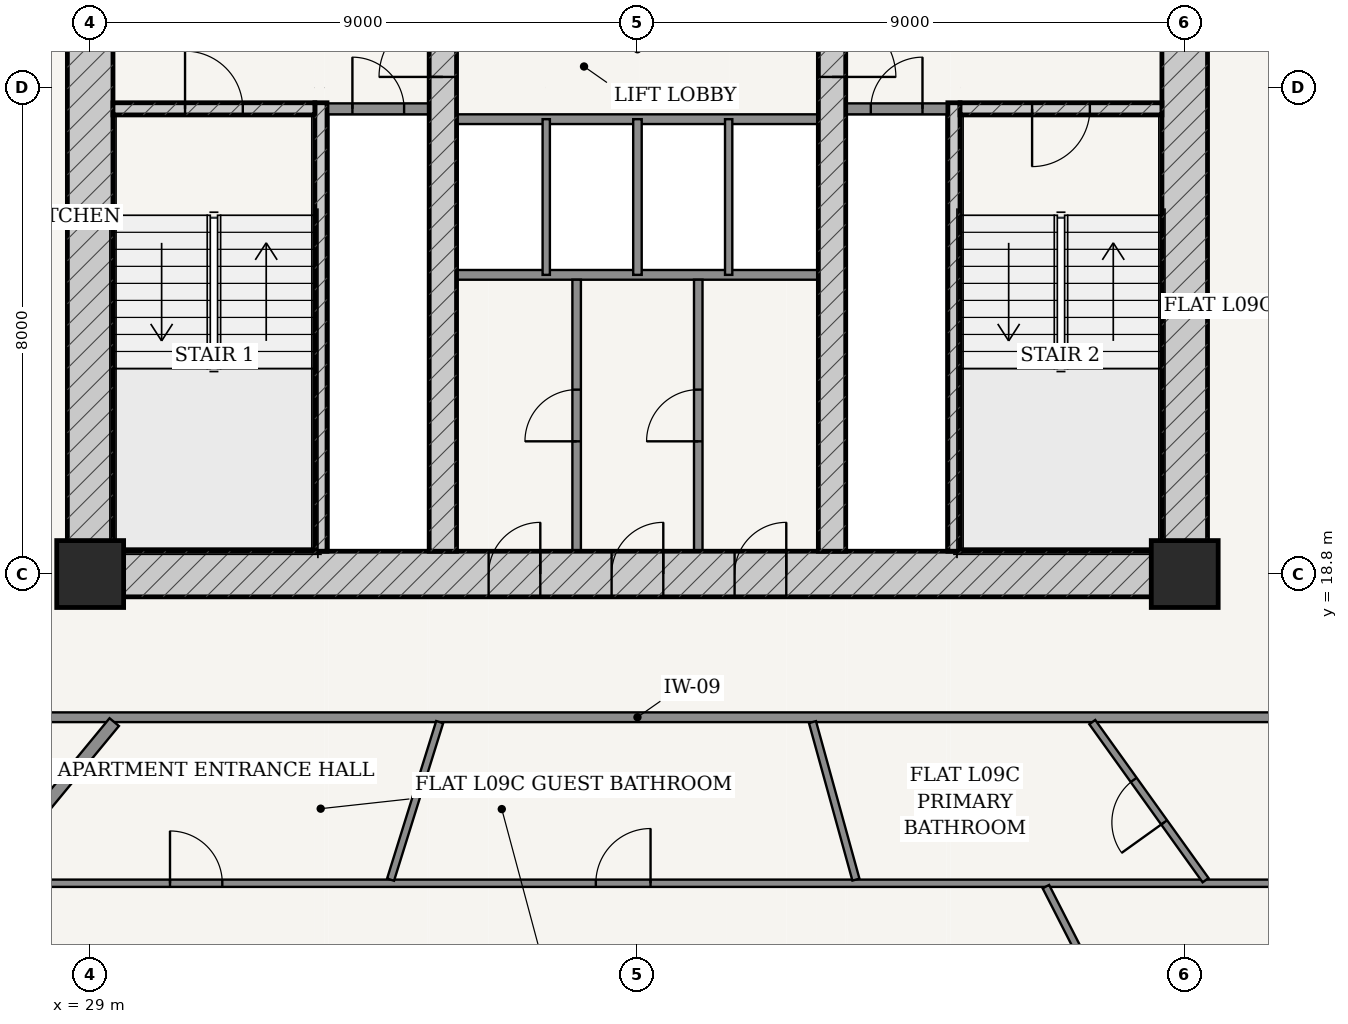
"""IFC4 building model, lengths in metres.
Left out: names, types, materials, properties, quantities, classifications, styles, units other than length and angle.
Written with IfcOpenShell. Run it as: python <this file> out.ifc"""

import sys

from ifc_helpers import new_model, si_unit, direction, frame, frame_2d, origin, origin_2d, place, context, subcontext, project, spatial, rectangle, extrude, source, transform, mapped, element, fill, save


model = new_model("IFC4")
c1 = context("Model", 3, precision=1e-05, world=origin(), true_north=direction((-0.2419218956, 0.970295726276)))
c2 = subcontext(c1, "Body", "Model", "MODEL_VIEW")
j1 = project(units=[si_unit("LENGTHUNIT", "METRE"), si_unit("PLANEANGLEUNIT", "RADIAN")], contexts=[c1])
p1 = place(None, origin())
s1 = spatial("IfcSite", under=j1, at=p1, CompositionType="ELEMENT")
p2 = place(p1, origin())
s2 = spatial("IfcBuilding", under=s1, at=p2, CompositionType="ELEMENT")
p3 = place(p2, frame((0.0, 0.0, 38.4)))
s3 = spatial("IfcBuildingStorey", under=s2, at=p3, CompositionType="ELEMENT", Elevation=38.4)
for number, where, z_axis, x_axis in (
    (1, (29.0, 18.8, 0.0), (0.0, 0.0, 1.0), (1.0, 0.0, 0.0)),
    (2, (47.0, 18.8, 0.0), (0.0, 0.0, 1.0), (1.0, 0.0, 0.0)),
):
    element("IfcColumn", number, at=place(p3, frame(where, z_axis=z_axis, x_axis=x_axis)), inside=s3, PredefinedType="COLUMN", context=c2, shape_type="SweptSolid", body=[
        extrude(rectangle(XDim=1.1, YDim=1.1, at=origin_2d()), origin(), (0.0, 0.0, 1.0), 3.6),
    ])
p4 = place(p3, frame((28.625, 18.8, 0.0), z_axis=(0.0, 0.0, 1.0), x_axis=(1.0, 0.0, 0.0)))
e3 = element("IfcWall", 3, at=p4, inside=s3, PredefinedType="SHEAR", context=c2, shape_type="SweptSolid", body=[
    extrude(rectangle(XDim=18.75, YDim=0.75, at=frame_2d((9.375, 0.0))), origin(), (0.0, 0.0, 1.0), 3.32),
])
p5 = place(p4, frame((6.927, 0.0, 0.0)))
e4 = element("IfcOpeningElement", 4, at=p5, cuts=e3, PredefinedType="OPENING", context=c2, shape_type="SweptSolid", body=[
    extrude(rectangle(XDim=0.85, YDim=2.1, at=frame_2d((0.425, 1.05))), frame((0.0, 0.385, 0.0), z_axis=(0.0, -1.0, 0.0), x_axis=(1.0, 0.0, 0.0)), (0.0, 0.0, 1.0), 0.77),
])
p6 = place(p4, frame((8.95, 0.0, 0.0)))
e5 = element("IfcOpeningElement", 5, at=p6, cuts=e3, PredefinedType="OPENING", context=c2, shape_type="SweptSolid", body=[
    extrude(rectangle(XDim=0.85, YDim=2.1, at=frame_2d((0.425, 1.05))), frame((0.0, 0.385, 0.0), z_axis=(0.0, -1.0, 0.0), x_axis=(1.0, 0.0, 0.0)), (0.0, 0.0, 1.0), 0.77),
])
p7 = place(p4, frame((10.972, 0.0, 0.0)))
e6 = element("IfcOpeningElement", 6, at=p7, cuts=e3, PredefinedType="OPENING", context=c2, shape_type="SweptSolid", body=[
    extrude(rectangle(XDim=0.85, YDim=2.1, at=frame_2d((0.425, 1.05))), frame((0.0, 0.385, 0.0), z_axis=(0.0, -1.0, 0.0), x_axis=(1.0, 0.0, 0.0)), (0.0, 0.0, 1.0), 0.77),
])
p8 = place(p3, frame((29.0, 19.175, 0.0), z_axis=(0.0, 0.0, 1.0), x_axis=(0.0, 1.0, 0.0)))
e7 = element("IfcWall", 7, at=p8, inside=s3, PredefinedType="SHEAR", context=c2, shape_type="SweptSolid", body=[
    extrude(rectangle(XDim=15.25, YDim=0.75, at=frame_2d((7.625, 0.0))), origin(), (0.0, 0.0, 1.0), 3.32),
])
p9 = place(p8, frame((9.875, 0.0, 0.0)))
e8 = element("IfcOpeningElement", 8, at=p9, cuts=e7, PredefinedType="OPENING", context=c2, shape_type="SweptSolid", body=[
    extrude(rectangle(XDim=1.5, YDim=2.2, at=frame_2d((0.75, 1.1))), frame((0.0, 0.385, 0.0), z_axis=(0.0, -1.0, 0.0), x_axis=(1.0, 0.0, 0.0)), (0.0, 0.0, 1.0), 0.77),
])
p10 = place(p3, frame((47.0, 19.175, 0.0), z_axis=(0.0, 0.0, 1.0), x_axis=(0.0, 1.0, 0.0)))
e9 = element("IfcWall", 9, at=p10, inside=s3, PredefinedType="SHEAR", context=c2, shape_type="SweptSolid", body=[
    extrude(rectangle(XDim=15.25, YDim=0.75, at=frame_2d((7.625, 0.0))), origin(), (0.0, 0.0, 1.0), 3.32),
])
p11 = place(p10, frame((9.875, 0.0, 0.0)))
e10 = element("IfcOpeningElement", 10, at=p11, cuts=e9, PredefinedType="OPENING", context=c2, shape_type="SweptSolid", body=[
    extrude(rectangle(XDim=1.5, YDim=2.2, at=frame_2d((0.75, 1.1))), frame((0.0, 0.385, 0.0), z_axis=(0.0, -1.0, 0.0), x_axis=(1.0, 0.0, 0.0)), (0.0, 0.0, 1.0), 0.77),
])
p12 = place(p3, frame((32.795, 19.175, 0.0), z_axis=(0.0, 0.0, 1.0), x_axis=(0.0, 1.0, 0.0)))
e11 = element("IfcWall", 11, at=p12, inside=s3, PredefinedType="SOLIDWALL", context=c2, shape_type="SweptSolid", body=[
    extrude(rectangle(XDim=7.375, YDim=0.2, at=frame_2d((3.688, 0.0))), origin(), (0.0, 0.0, 1.0), 3.32),
])
p13 = place(p3, frame((29.375, 26.45, 0.0), z_axis=(0.0, 0.0, 1.0), x_axis=(1.0, 0.0, 0.0)))
e12 = element("IfcWall", 12, at=p13, inside=s3, PredefinedType="SOLIDWALL", context=c2, shape_type="SweptSolid", body=[
    extrude(rectangle(XDim=3.32, YDim=0.2, at=frame_2d((1.66, 0.0))), origin(), (0.0, 0.0, 1.0), 3.32),
])
p14 = place(p13, frame((1.185, 0.0, 0.0)))
e13 = element("IfcOpeningElement", 13, at=p14, cuts=e12, PredefinedType="OPENING", context=c2, shape_type="SweptSolid", body=[
    extrude(rectangle(XDim=0.95, YDim=2.15, at=frame_2d((0.475, 1.075))), frame((0.0, 0.11, 0.0), z_axis=(0.0, -1.0, 0.0), x_axis=(1.0, 0.0, 0.0)), (0.0, 0.0, 1.0), 0.22),
])
p15 = place(p3, frame((43.205, 19.175, 0.0), z_axis=(0.0, 0.0, 1.0), x_axis=(0.0, 1.0, 0.0)))
e14 = element("IfcWall", 14, at=p15, inside=s3, PredefinedType="SOLIDWALL", context=c2, shape_type="SweptSolid", body=[
    extrude(rectangle(XDim=7.375, YDim=0.2, at=frame_2d((3.688, 0.0))), origin(), (0.0, 0.0, 1.0), 3.32),
])
p16 = place(p3, frame((43.305, 26.45, 0.0), z_axis=(0.0, 0.0, 1.0), x_axis=(1.0, 0.0, 0.0)))
e15 = element("IfcWall", 15, at=p16, inside=s3, PredefinedType="SOLIDWALL", context=c2, shape_type="SweptSolid", body=[
    extrude(rectangle(XDim=3.32, YDim=0.2, at=frame_2d((1.66, 0.0))), origin(), (0.0, 0.0, 1.0), 3.32),
])
p17 = place(p16, frame((1.185, 0.0, 0.0)))
e16 = element("IfcOpeningElement", 16, at=p17, cuts=e15, PredefinedType="OPENING", context=c2, shape_type="SweptSolid", body=[
    extrude(rectangle(XDim=0.95, YDim=2.15, at=frame_2d((0.475, 1.075))), frame((0.0, 0.11, 0.0), z_axis=(0.0, -1.0, 0.0), x_axis=(1.0, 0.0, 0.0)), (0.0, 0.0, 1.0), 0.22),
])
p18 = place(p3, frame((34.8, 19.175, 0.0), z_axis=(0.0, 0.0, 1.0), x_axis=(0.0, 1.0, 0.0)))
e17 = element("IfcWall", 17, at=p18, inside=s3, PredefinedType="SHEAR", context=c2, shape_type="SweptSolid", body=[
    extrude(rectangle(XDim=15.25, YDim=0.45, at=frame_2d((7.625, 0.0))), origin(), (0.0, 0.0, 1.0), 3.32),
])
p19 = place(p18, frame((7.8, 0.0, 0.0)))
e18 = element("IfcOpeningElement", 18, at=p19, cuts=e17, PredefinedType="OPENING", context=c2, shape_type="SweptSolid", body=[
    extrude(rectangle(XDim=1.05, YDim=2.15, at=frame_2d((0.525, 1.075))), frame((0.0, 0.235, 0.0), z_axis=(0.0, -1.0, 0.0), x_axis=(1.0, 0.0, 0.0)), (0.0, 0.0, 1.0), 0.47),
])
p20 = place(p3, frame((41.2, 19.175, 0.0), z_axis=(0.0, 0.0, 1.0), x_axis=(0.0, 1.0, 0.0)))
e19 = element("IfcWall", 19, at=p20, inside=s3, PredefinedType="SHEAR", context=c2, shape_type="SweptSolid", body=[
    extrude(rectangle(XDim=15.25, YDim=0.45, at=frame_2d((7.625, 0.0))), origin(), (0.0, 0.0, 1.0), 3.32),
])
p21 = place(p20, frame((7.8, 0.0, 0.0)))
e20 = element("IfcOpeningElement", 20, at=p21, cuts=e19, PredefinedType="OPENING", context=c2, shape_type="SweptSolid", body=[
    extrude(rectangle(XDim=1.05, YDim=2.15, at=frame_2d((0.525, 1.075))), frame((0.0, 0.235, 0.0), z_axis=(0.0, -1.0, 0.0), x_axis=(1.0, 0.0, 0.0)), (0.0, 0.0, 1.0), 0.47),
])
p22 = place(p3, frame((32.9, 26.45, 0.0), z_axis=(0.0, 0.0, 1.0), x_axis=(1.0, 0.0, 0.0)))
e21 = element("IfcWall", 21, at=p22, inside=s3, PredefinedType="PARTITIONING", context=c2, shape_type="SweptSolid", body=[
    extrude(rectangle(XDim=1.675, YDim=0.18, at=frame_2d((0.837, 0.0))), origin(), (0.0, 0.0, 1.0), 3.32),
])
p23 = place(p22, frame((0.413, 0.0, 0.0)))
e22 = element("IfcOpeningElement", 22, at=p23, cuts=e21, PredefinedType="OPENING", context=c2, shape_type="SweptSolid", body=[
    extrude(rectangle(XDim=0.85, YDim=2.1, at=frame_2d((0.425, 1.05))), frame((0.0, 0.1, 0.0), z_axis=(0.0, -1.0, 0.0), x_axis=(1.0, 0.0, 0.0)), (0.0, 0.0, 1.0), 0.2),
])
p24 = place(p3, frame((41.425, 26.45, 0.0), z_axis=(0.0, 0.0, 1.0), x_axis=(1.0, 0.0, 0.0)))
e23 = element("IfcWall", 23, at=p24, inside=s3, PredefinedType="PARTITIONING", context=c2, shape_type="SweptSolid", body=[
    extrude(rectangle(XDim=1.675, YDim=0.18, at=frame_2d((0.837, 0.0))), origin(), (0.0, 0.0, 1.0), 3.32),
])
p25 = place(p24, frame((0.413, 0.0, 0.0)))
e24 = element("IfcOpeningElement", 24, at=p25, cuts=e23, PredefinedType="OPENING", context=c2, shape_type="SweptSolid", body=[
    extrude(rectangle(XDim=0.85, YDim=2.1, at=frame_2d((0.425, 1.05))), frame((0.0, 0.1, 0.0), z_axis=(0.0, -1.0, 0.0), x_axis=(1.0, 0.0, 0.0)), (0.0, 0.0, 1.0), 0.2),
])
for number, where, z_axis, x_axis in (
    (25, (35.025, 26.28, 0.0), (0.0, 0.0, 1.0), (1.0, 0.0, 0.0)),
    (26, (35.025, 23.72, 0.0), (0.0, 0.0, 1.0), (1.0, 0.0, 0.0)),
):
    element("IfcWall", number, at=place(p3, frame(where, z_axis=z_axis, x_axis=x_axis)), inside=s3, PredefinedType="PARTITIONING", context=c2, shape_type="SweptSolid", body=[
        extrude(rectangle(XDim=5.95, YDim=0.16, at=frame_2d((2.975, 0.0))), origin(), (0.0, 0.0, 1.0), 3.32),
    ])
p26 = place(p3, frame((36.5, 23.72, 0.0), z_axis=(0.0, 0.0, 1.0), x_axis=(0.0, 1.0, 0.0)))
e27 = element("IfcWall", 27, at=p26, inside=s3, PredefinedType="PARTITIONING", context=c2, shape_type="SweptSolid", body=[
    extrude(rectangle(XDim=2.56, YDim=0.12, at=frame_2d((1.28, 0.0))), origin(), (0.0, 0.0, 1.0), 3.32),
])
p27 = place(p3, frame((38.0, 23.72, 0.0), z_axis=(0.0, 0.0, 1.0), x_axis=(0.0, 1.0, 0.0)))
e28 = element("IfcWall", 28, at=p27, inside=s3, PredefinedType="PARTITIONING", context=c2, shape_type="SweptSolid", body=[
    extrude(rectangle(XDim=2.56, YDim=0.14, at=frame_2d((1.28, 0.0))), origin(), (0.0, 0.0, 1.0), 3.32),
])
p28 = place(p3, frame((39.5, 23.72, 0.0), z_axis=(0.0, 0.0, 1.0), x_axis=(0.0, 1.0, 0.0)))
e29 = element("IfcWall", 29, at=p28, inside=s3, PredefinedType="PARTITIONING", context=c2, shape_type="SweptSolid", body=[
    extrude(rectangle(XDim=2.56, YDim=0.12, at=frame_2d((1.28, 0.0))), origin(), (0.0, 0.0, 1.0), 3.32),
])
p29 = place(p3, frame((37.0, 19.175, 0.0), z_axis=(0.0, 0.0, 1.0), x_axis=(0.0, 1.0, 0.0)))
e30 = element("IfcWall", 30, at=p29, inside=s3, PredefinedType="PARTITIONING", context=c2, shape_type="SweptSolid", body=[
    extrude(rectangle(XDim=4.465, YDim=0.14, at=frame_2d((2.232, 0.0))), origin(), (0.0, 0.0, 1.0), 3.32),
])
p30 = place(p29, frame((1.808, 0.0, 0.0)))
e31 = element("IfcOpeningElement", 31, at=p30, cuts=e30, PredefinedType="OPENING", context=c2, shape_type="SweptSolid", body=[
    extrude(rectangle(XDim=0.85, YDim=2.1, at=frame_2d((0.425, 1.05))), frame((0.0, 0.08, 0.0), z_axis=(0.0, -1.0, 0.0), x_axis=(1.0, 0.0, 0.0)), (0.0, 0.0, 1.0), 0.16),
])
p31 = place(p3, frame((39.0, 19.175, 0.0), z_axis=(0.0, 0.0, 1.0), x_axis=(0.0, 1.0, 0.0)))
e32 = element("IfcWall", 32, at=p31, inside=s3, PredefinedType="PARTITIONING", context=c2, shape_type="SweptSolid", body=[
    extrude(rectangle(XDim=4.465, YDim=0.14, at=frame_2d((2.232, 0.0))), origin(), (0.0, 0.0, 1.0), 3.32),
])
p32 = place(p31, frame((1.808, 0.0, 0.0)))
e33 = element("IfcOpeningElement", 33, at=p32, cuts=e32, PredefinedType="OPENING", context=c2, shape_type="SweptSolid", body=[
    extrude(rectangle(XDim=0.85, YDim=2.1, at=frame_2d((0.425, 1.05))), frame((0.0, 0.08, 0.0), z_axis=(0.0, -1.0, 0.0), x_axis=(1.0, 0.0, 0.0)), (0.0, 0.0, 1.0), 0.16),
])
p33 = place(p3, frame((26.645, 16.445, 0.0), z_axis=(0.0, 0.0, 1.0), x_axis=(1.0, 0.0, 0.0)))
e34 = element("IfcWall", 34, at=p33, inside=s3, PredefinedType="PARTITIONING", context=c2, shape_type="SweptSolid", body=[
    extrude(rectangle(XDim=22.71, YDim=0.16, at=frame_2d((11.355, 0.0))), origin(), (0.0, 0.0, 1.0), 2.688),
])
p34 = place(p3, frame((29.396, 16.365, 0.0), z_axis=(0.0, 0.0, 1.0), x_axis=(-0.636186165667, -0.771535587393, 0.0)))
e35 = element("IfcWall", 35, at=p34, inside=s3, PredefinedType="PARTITIONING", context=c2, shape_type="SweptSolid", body=[
    extrude(rectangle(XDim=11.683, YDim=0.2, at=frame_2d((5.842, 0.0))), origin(), (0.0, 0.0, 1.0), 2.688),
])
p35 = place(p3, frame((52.085, 13.715, 0.0), z_axis=(0.0, 0.0, 1.0), x_axis=(-1.0, 0.0, 0.0)))
e36 = element("IfcWall", 36, at=p35, inside=s3, PredefinedType="PARTITIONING", context=c2, shape_type="SweptSolid", body=[
    extrude(rectangle(XDim=24.772, YDim=0.12, at=frame_2d((12.386, 0.0))), origin(), (0.0, 0.0, 1.0), 2.688),
])
p36 = place(p35, frame((20.912, 0.0, 0.0)))
e37 = element("IfcOpeningElement", 37, at=p36, cuts=e36, PredefinedType="OPENING", context=c2, shape_type="SweptSolid", body=[
    extrude(rectangle(XDim=0.86, YDim=2.15, at=frame_2d((0.43, 1.075))), frame((0.0, 0.07, 0.0), z_axis=(0.0, -1.0, 0.0), x_axis=(1.0, 0.0, 0.0)), (0.0, 0.0, 1.0), 0.14),
])
p37 = place(p35, frame((13.87, 0.0, 0.0)))
e38 = element("IfcOpeningElement", 38, at=p37, cuts=e36, PredefinedType="OPENING", context=c2, shape_type="SweptSolid", body=[
    extrude(rectangle(XDim=0.9, YDim=2.15, at=frame_2d((0.45, 1.075))), frame((0.0, 0.07, 0.0), z_axis=(0.0, -1.0, 0.0), x_axis=(1.0, 0.0, 0.0)), (0.0, 0.0, 1.0), 0.14),
])
p38 = place(p3, frame((44.717, 13.66, 0.0), z_axis=(0.0, 0.0, 1.0), x_axis=(0.455131303234, -0.890424335256, 0.0)))
e39 = element("IfcWall", 39, at=p38, inside=s3, PredefinedType="PARTITIONING", context=c2, shape_type="SweptSolid", body=[
    extrude(rectangle(XDim=9.562, YDim=0.12, at=frame_2d((4.781, 0.0))), origin(), (0.0, 0.0, 1.0), 2.762),
])
p39 = place(p38, frame((4.331, 0.0, 0.0)))
e40 = element("IfcOpeningElement", 40, at=p39, cuts=e39, PredefinedType="OPENING", context=c2, shape_type="SweptSolid", body=[
    extrude(rectangle(XDim=0.9, YDim=2.15, at=frame_2d((0.45, 1.075))), frame((0.0, 0.07, 0.0), z_axis=(0.0, -1.0, 0.0), x_axis=(1.0, 0.0, 0.0)), (0.0, 0.0, 1.0), 0.14),
])
p40 = place(p3, frame((34.748, 16.365, 0.0), z_axis=(0.0, 0.0, 1.0), x_axis=(-0.297598752493, -0.954691040345, 0.0)))
e41 = element("IfcWall", 41, at=p40, inside=s3, PredefinedType="PARTITIONING", context=c2, shape_type="SweptSolid", body=[
    extrude(rectangle(XDim=2.714, YDim=0.12, at=frame_2d((1.357, 0.0))), origin(), (0.0, 0.0, 1.0), 3.32),
])
p41 = place(p3, frame((40.878, 16.365, 0.0), z_axis=(0.0, 0.0, 1.0), x_axis=(0.265853298244, -0.964013497734, 0.0)))
e42 = element("IfcWall", 42, at=p41, inside=s3, PredefinedType="PARTITIONING", context=c2, shape_type="SweptSolid", body=[
    extrude(rectangle(XDim=2.687, YDim=0.12, at=frame_2d((1.344, 0.0))), origin(), (0.0, 0.0, 1.0), 3.32),
])
p42 = place(p3, frame((45.48, 16.365, 0.0), z_axis=(0.0, 0.0, 1.0), x_axis=(0.582566008831, -0.812783393872, 0.0)))
e43 = element("IfcWall", 43, at=p42, inside=s3, PredefinedType="PARTITIONING", context=c2, shape_type="SweptSolid", body=[
    extrude(rectangle(XDim=3.198, YDim=0.12, at=frame_2d((1.599, 0.0))), origin(), (0.0, 0.0, 1.0), 3.32),
])
p43 = place(p42, frame((1.169, 0.0, 0.0)))
e44 = element("IfcOpeningElement", 44, at=p43, cuts=e43, PredefinedType="OPENING", context=c2, shape_type="SweptSolid", body=[
    extrude(rectangle(XDim=0.86, YDim=2.15, at=frame_2d((0.43, 1.075))), frame((0.0, 0.07, 0.0), z_axis=(0.0, -1.0, 0.0), x_axis=(1.0, 0.0, 0.0)), (0.0, 0.0, 1.0), 0.14),
])
m1 = source(origin(), c2, "Body", "SweptSolid", [
    extrude(rectangle(XDim=1.05, YDim=2.15, at=frame_2d((0.525, 1.075))), frame((0.0, 0.025, 0.0), z_axis=(0.0, -1.0, 0.0), x_axis=(1.0, 0.0, 0.0)), (0.0, 0.0, 1.0), 0.05),
])
p44 = place(p19, origin())
e45 = element("IfcDoor", 45, at=p44, inside=s3, OperationType="SINGLE_SWING_LEFT", PredefinedType="DOOR", context=c2, shape_type="MappedRepresentation", body=[
    mapped(m1, transform((0.0, 0.0, 0.0), scale=1.0)),
])
fill(e18, e45)
p45 = place(p21, frame((1.05, 0.0, 0.0), z_axis=(0.0, 0.0, 1.0), x_axis=(-1.0, 0.0, 0.0)))
e46 = element("IfcDoor", 46, at=p45, inside=s3, OperationType="SINGLE_SWING_RIGHT", PredefinedType="DOOR", context=c2, shape_type="MappedRepresentation", body=[
    mapped(m1, transform((0.0, 0.0, 0.0), scale=1.0)),
])
fill(e20, e46)
m2 = source(origin(), c2, "Body", "SweptSolid", [
    extrude(rectangle(XDim=0.95, YDim=2.15, at=frame_2d((0.475, 1.075))), frame((0.0, 0.025, 0.0), z_axis=(0.0, -1.0, 0.0), x_axis=(1.0, 0.0, 0.0)), (0.0, 0.0, 1.0), 0.05),
])
p46 = place(p14, origin())
e47 = element("IfcDoor", 47, at=p46, inside=s3, OperationType="SINGLE_SWING_LEFT", PredefinedType="DOOR", context=c2, shape_type="MappedRepresentation", body=[
    mapped(m2, transform((0.0, 0.0, 0.0), scale=1.0)),
])
fill(e13, e47)
p47 = place(p17, frame((0.95, 0.0, 0.0), z_axis=(0.0, 0.0, 1.0), x_axis=(-1.0, 0.0, 0.0)))
e48 = element("IfcDoor", 48, at=p47, inside=s3, OperationType="SINGLE_SWING_RIGHT", PredefinedType="DOOR", context=c2, shape_type="MappedRepresentation", body=[
    mapped(m2, transform((0.0, 0.0, 0.0), scale=1.0)),
])
fill(e16, e48)
m3 = source(origin(), c2, "Body", "SweptSolid", [
    extrude(rectangle(XDim=0.85, YDim=2.1, at=frame_2d((0.425, 1.05))), frame((0.0, 0.025, 0.0), z_axis=(0.0, -1.0, 0.0), x_axis=(1.0, 0.0, 0.0)), (0.0, 0.0, 1.0), 0.05),
])
p48 = place(p23, origin())
e49 = element("IfcDoor", 49, at=p48, inside=s3, OperationType="SINGLE_SWING_LEFT", PredefinedType="DOOR", context=c2, shape_type="MappedRepresentation", body=[
    mapped(m3, transform((0.0, 0.0, 0.0), scale=1.0)),
])
fill(e22, e49)
p49 = place(p25, origin())
e50 = element("IfcDoor", 50, at=p49, inside=s3, OperationType="SINGLE_SWING_RIGHT", PredefinedType="DOOR", context=c2, shape_type="MappedRepresentation", body=[
    mapped(m3, transform((0.0, 0.0, 0.0), scale=1.0)),
])
fill(e24, e50)
p50 = place(p5, origin())
e51 = element("IfcDoor", 51, at=p50, inside=s3, OperationType="SINGLE_SWING_RIGHT", PredefinedType="DOOR", context=c2, shape_type="MappedRepresentation", body=[
    mapped(m3, transform((0.0, 0.0, 0.0), scale=1.0)),
])
fill(e4, e51)
p51 = place(p6, origin())
e52 = element("IfcDoor", 52, at=p51, inside=s3, OperationType="SINGLE_SWING_RIGHT", PredefinedType="DOOR", context=c2, shape_type="MappedRepresentation", body=[
    mapped(m3, transform((0.0, 0.0, 0.0), scale=1.0)),
])
fill(e5, e52)
p52 = place(p7, origin())
e53 = element("IfcDoor", 53, at=p52, inside=s3, OperationType="SINGLE_SWING_RIGHT", PredefinedType="DOOR", context=c2, shape_type="MappedRepresentation", body=[
    mapped(m3, transform((0.0, 0.0, 0.0), scale=1.0)),
])
fill(e6, e53)
p53 = place(p30, origin())
e54 = element("IfcDoor", 54, at=p53, inside=s3, OperationType="SINGLE_SWING_LEFT", PredefinedType="DOOR", context=c2, shape_type="MappedRepresentation", body=[
    mapped(m3, transform((0.0, 0.0, 0.0), scale=1.0)),
])
fill(e31, e54)
p54 = place(p32, origin())
e55 = element("IfcDoor", 55, at=p54, inside=s3, OperationType="SINGLE_SWING_LEFT", PredefinedType="DOOR", context=c2, shape_type="MappedRepresentation", body=[
    mapped(m3, transform((0.0, 0.0, 0.0), scale=1.0)),
])
fill(e33, e55)
m4 = source(origin(), c2, "Body", "SweptSolid", [
    extrude(rectangle(XDim=0.86, YDim=2.15, at=frame_2d((0.43, 1.075))), frame((0.0, 0.025, 0.0), z_axis=(0.0, -1.0, 0.0), x_axis=(1.0, 0.0, 0.0)), (0.0, 0.0, 1.0), 0.05),
])
p55 = place(p43, frame((0.86, 0.0, 0.0), z_axis=(0.0, 0.0, 1.0), x_axis=(-1.0, 0.0, 0.0)))
e56 = element("IfcDoor", 56, at=p55, inside=s3, OperationType="SINGLE_SWING_LEFT", PredefinedType="DOOR", context=c2, shape_type="MappedRepresentation", body=[
    mapped(m4, transform((0.0, 0.0, 0.0), scale=1.0)),
])
fill(e44, e56)
p56 = place(p36, frame((0.86, 0.0, 0.0), z_axis=(0.0, 0.0, 1.0), x_axis=(-1.0, 0.0, 0.0)))
e57 = element("IfcDoor", 57, at=p56, inside=s3, OperationType="SINGLE_SWING_LEFT", PredefinedType="DOOR", context=c2, shape_type="MappedRepresentation", body=[
    mapped(m4, transform((0.0, 0.0, 0.0), scale=1.0)),
])
fill(e37, e57)
m5 = source(origin(), c2, "Body", "SweptSolid", [
    extrude(rectangle(XDim=0.9, YDim=2.15, at=frame_2d((0.45, 1.075))), frame((0.0, 0.025, 0.0), z_axis=(0.0, -1.0, 0.0), x_axis=(1.0, 0.0, 0.0)), (0.0, 0.0, 1.0), 0.05),
])
p57 = place(p37, frame((0.9, 0.0, 0.0), z_axis=(0.0, 0.0, 1.0), x_axis=(-1.0, 0.0, 0.0)))
e58 = element("IfcDoor", 58, at=p57, inside=s3, OperationType="SINGLE_SWING_RIGHT", PredefinedType="DOOR", context=c2, shape_type="MappedRepresentation", body=[
    mapped(m5, transform((0.0, 0.0, 0.0), scale=1.0)),
])
fill(e38, e58)
save(model, sys.argv[1])
